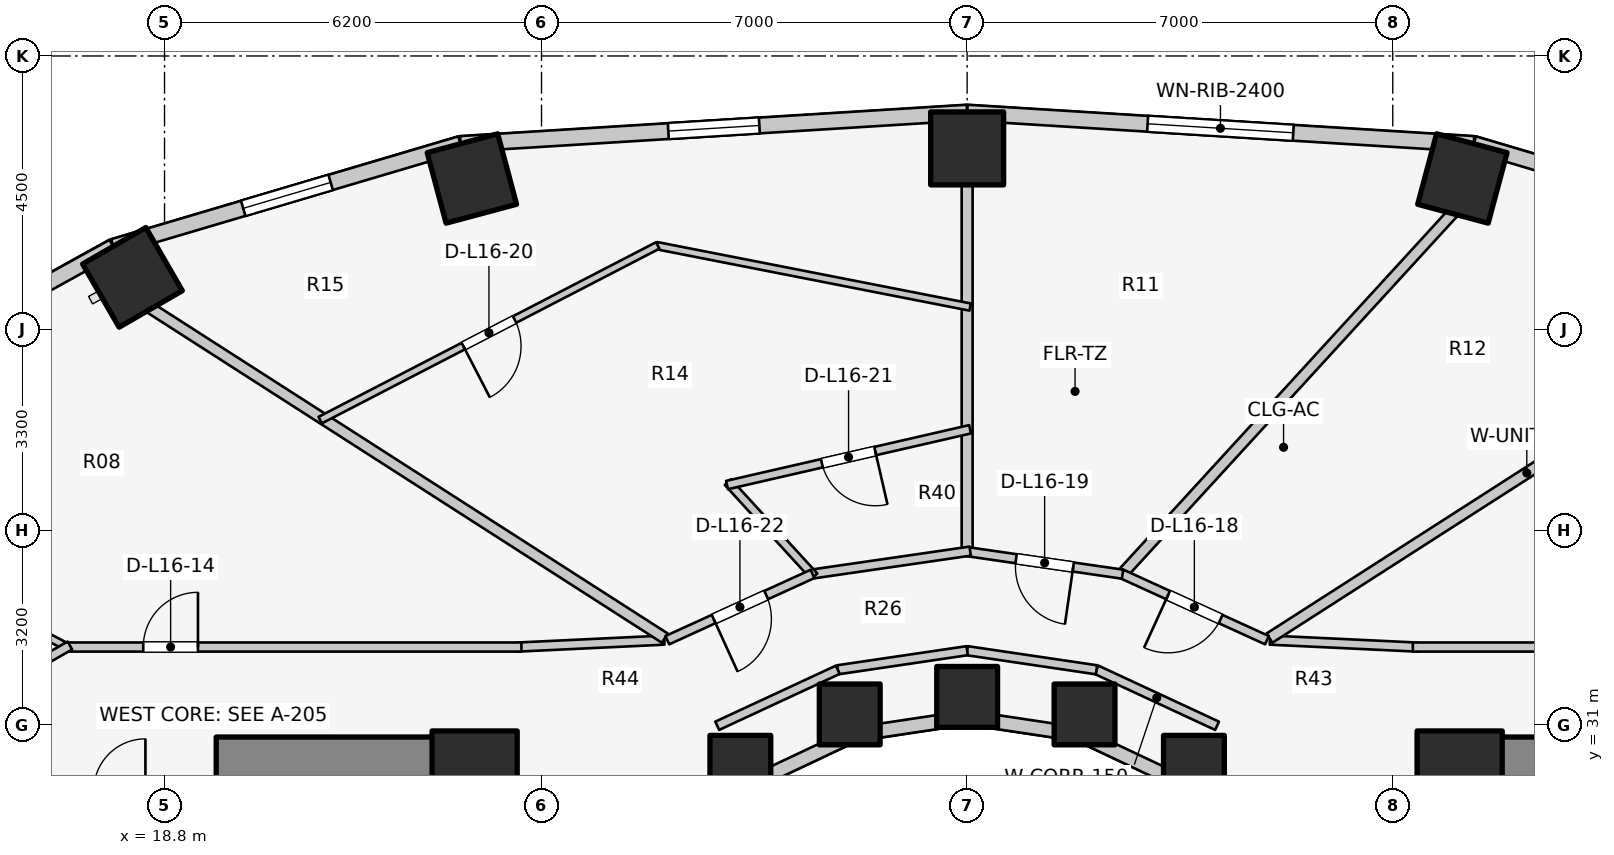
"""IFC4 building model, lengths in metres.
Left out: names, types, materials, properties, quantities, classifications, styles, units other than length and angle.
Written with IfcOpenShell. Run it as: python <this file> out.ifc"""

import sys

from ifc_helpers import new_model, si_unit, direction, frame, frame_2d, origin, origin_2d, place, context, subcontext, project, spatial, rectangle, extrude, element, fill, save


model = new_model("IFC4")
c1 = context("Model", 3, precision=1e-05, world=origin(), true_north=direction((0.0, 1.0)))
c2 = subcontext(c1, "Body", "Model", "MODEL_VIEW")
j1 = project(units=[si_unit("LENGTHUNIT", "METRE"), si_unit("PLANEANGLEUNIT", "RADIAN")], contexts=[c1])
p1 = place(None, origin())
s1 = spatial("IfcSite", under=j1, at=p1, CompositionType="ELEMENT")
p2 = place(p1, origin())
s2 = spatial("IfcBuilding", under=s1, at=p2, CompositionType="ELEMENT")
p3 = place(p2, frame((0.0, 0.0, 55.5)))
s3 = spatial("IfcBuildingStorey", under=s2, at=p3, CompositionType="ELEMENT", Elevation=55.5)
for number, where, z_axis, x_axis in (
    (1, (19.65, 30.35, 0.0), (0.0, 0.0, 1.0), (1.0, 0.0, 0.0)),
    (2, (39.85, 30.35, 0.0), (0.0, 0.0, 1.0), (1.0, 0.0, 0.0)),
):
    element("IfcWall", number, at=place(p3, frame(where, z_axis=z_axis, x_axis=x_axis)), inside=s3, PredefinedType="SHEAR", context=c2, shape_type="SweptSolid", body=[
        extrude(rectangle(XDim=4.5, YDim=0.9, at=frame_2d((2.25, 0.0))), origin(), (0.0, 0.0, 1.0), 3.1),
    ])
for number, where, z_axis, x_axis in (
    (3, (23.9, 30.2, 0.0), (0.0, 0.0, 1.0), (1.0, 0.0, 0.0)),
    (4, (40.1, 30.2, 0.0), (0.0, 0.0, 1.0), (1.0, 0.0, 0.0)),
):
    element("IfcColumn", number, at=place(p3, frame(where, z_axis=z_axis, x_axis=x_axis)), inside=s3, PredefinedType="COLUMN", context=c2, shape_type="SweptSolid", body=[
        extrude(rectangle(XDim=1.4, YDim=1.4, at=origin_2d()), origin(), (0.0, 0.0, 1.0), 3.1),
    ])
for number, where, z_axis, x_axis in (
    (5, (35.73, 30.327, 0.0), (0.0, 0.0, 1.0), (1.0, 0.0, 0.0)),
    (6, (33.931, 31.172, 0.0), (0.0, 0.0, 1.0), (1.0, 0.0, 0.0)),
):
    element("IfcColumn", number, at=place(p3, frame(where, z_axis=z_axis, x_axis=x_axis)), inside=s3, PredefinedType="COLUMN", context=c2, shape_type="SweptSolid", body=[
        extrude(rectangle(XDim=1.0, YDim=1.0, at=origin_2d()), origin(), (0.0, 0.0, 1.0), 3.1),
    ])
p4 = place(p3, frame((40.145, 39.986, 0.0), z_axis=(0.0, 0.0, 1.0), x_axis=(0.258819045103, 0.965925826289, 0.0)))
e7 = element("IfcColumn", 7, at=p4, inside=s3, PredefinedType="COLUMN", context=c2, shape_type="SweptSolid", body=[
    extrude(rectangle(XDim=1.2, YDim=1.2, at=origin_2d()), origin(), (0.0, 0.0, 1.0), 3.1),
])
p5 = place(p3, frame((32.0, 31.46, 0.0), z_axis=(0.0, 0.0, 1.0), x_axis=(1.0, 0.0, 0.0)))
e8 = element("IfcColumn", 8, at=p5, inside=s3, PredefinedType="COLUMN", context=c2, shape_type="SweptSolid", body=[
    extrude(rectangle(XDim=1.0, YDim=1.0, at=origin_2d()), origin(), (0.0, 0.0, 1.0), 3.1),
])
p6 = place(p3, frame((32.0, 40.48, 0.0), z_axis=(0.0, 0.0, 1.0), x_axis=(0.0, 1.0, 0.0)))
e9 = element("IfcColumn", 9, at=p6, inside=s3, PredefinedType="COLUMN", context=c2, shape_type="SweptSolid", body=[
    extrude(rectangle(XDim=1.2, YDim=1.2, at=origin_2d()), origin(), (0.0, 0.0, 1.0), 3.1),
])
p7 = place(p3, frame((30.069, 31.172, 0.0), z_axis=(0.0, 0.0, 1.0), x_axis=(1.0, 0.0, 0.0)))
e10 = element("IfcColumn", 10, at=p7, inside=s3, PredefinedType="COLUMN", context=c2, shape_type="SweptSolid", body=[
    extrude(rectangle(XDim=1.0, YDim=1.0, at=origin_2d()), origin(), (0.0, 0.0, 1.0), 3.1),
])
p8 = place(p3, frame((23.855, 39.986, 0.0), z_axis=(0.0, 0.0, 1.0), x_axis=(-0.258819045103, 0.965925826289, 0.0)))
e11 = element("IfcColumn", 11, at=p8, inside=s3, PredefinedType="COLUMN", context=c2, shape_type="SweptSolid", body=[
    extrude(rectangle(XDim=1.2, YDim=1.2, at=origin_2d()), origin(), (0.0, 0.0, 1.0), 3.1),
])
p9 = place(p3, frame((28.27, 30.327, 0.0), z_axis=(0.0, 0.0, 1.0), x_axis=(1.0, 0.0, 0.0)))
e12 = element("IfcColumn", 12, at=p9, inside=s3, PredefinedType="COLUMN", context=c2, shape_type="SweptSolid", body=[
    extrude(rectangle(XDim=1.0, YDim=1.0, at=origin_2d()), origin(), (0.0, 0.0, 1.0), 3.1),
])
p10 = place(p3, frame((18.273, 38.359, 0.0), z_axis=(0.0, 0.0, 1.0), x_axis=(-0.5, 0.866025403784, 0.0)))
e13 = element("IfcColumn", 13, at=p10, inside=s3, PredefinedType="COLUMN", context=c2, shape_type="SweptSolid", body=[
    extrude(rectangle(XDim=1.2, YDim=1.2, at=origin_2d()), origin(), (0.0, 0.0, 1.0), 3.1),
])
p11 = place(p3, frame((35.56, 30.032, 0.0), z_axis=(0.0, 0.0, 1.0), x_axis=(-0.904179699603, 0.427152280606, 0.0)))
e14 = element("IfcWall", 14, at=p11, inside=s3, PredefinedType="STANDARD", context=c2, shape_type="SweptSolid", body=[
    extrude(rectangle(XDim=1.899, YDim=0.23, at=frame_2d((0.95, 0.0))), origin(), (0.0, 0.0, 1.0), 2.16),
])
for number, where, z_axis, x_axis in (
    (15, (33.843, 30.843, 0.0), (0.0, 0.0, 1.0), (-0.989, 0.149, 0.0)),
    (16, (32.0, 31.12, 0.0), (0.0, 0.0, 1.0), (-0.989, -0.149, 0.0)),
):
    element("IfcWall", number, at=place(p3, frame(where, z_axis=z_axis, x_axis=x_axis)), inside=s3, PredefinedType="STANDARD", context=c2, shape_type="SweptSolid", body=[
        extrude(rectangle(XDim=1.864, YDim=0.23, at=frame_2d((0.932, 0.0))), origin(), (0.0, 0.0, 1.0), 2.16),
    ])
p12 = place(p3, frame((30.157, 30.843, 0.0), z_axis=(0.0, 0.0, 1.0), x_axis=(-0.904179699603, -0.427152280606, 0.0)))
e17 = element("IfcWall", 17, at=p12, inside=s3, PredefinedType="STANDARD", context=c2, shape_type="SweptSolid", body=[
    extrude(rectangle(XDim=1.899, YDim=0.23, at=frame_2d((0.95, 0.0))), origin(), (0.0, 0.0, 1.0), 2.16),
])
p13 = place(p3, frame((46.042, 38.862, 0.0), z_axis=(0.0, 0.0, 1.0), x_axis=(-0.958843593522, 0.283934786811, 0.0)))
e18 = element("IfcWall", 18, at=p13, inside=s3, PredefinedType="STANDARD", context=c2, shape_type="SweptSolid", body=[
    extrude(rectangle(XDim=5.955, YDim=0.26, at=frame_2d((2.978, 0.0))), origin(), (0.0, 0.0, 1.0), 2.85),
])
p14 = place(p13, frame((2.228, 0.0, 0.75)))
e19 = element("IfcOpeningElement", 19, at=p14, cuts=e18, PredefinedType="OPENING", context=c2, shape_type="SweptSolid", body=[
    extrude(rectangle(XDim=1.5, YDim=1.6, at=frame_2d((0.75, 0.8))), frame((0.0, 0.14, 0.0), z_axis=(0.0, -1.0, 0.0), x_axis=(1.0, 0.0, 0.0)), (0.0, 0.0, 1.0), 0.28),
])
p15 = place(p3, frame((40.332, 40.553, 0.0), z_axis=(0.0, 0.0, 1.0), x_axis=(-0.998090514779, 0.061768311519, 0.0)))
e20 = element("IfcWall", 20, at=p15, inside=s3, PredefinedType="STANDARD", context=c2, shape_type="SweptSolid", body=[
    extrude(rectangle(XDim=8.348, YDim=0.26, at=frame_2d((4.174, 0.0))), origin(), (0.0, 0.0, 1.0), 2.85),
])
p16 = place(p15, frame((2.974, 0.0, 0.75)))
e21 = element("IfcOpeningElement", 21, at=p16, cuts=e20, PredefinedType="OPENING", context=c2, shape_type="SweptSolid", body=[
    extrude(rectangle(XDim=2.4, YDim=1.7, at=frame_2d((1.2, 0.85))), frame((0.0, 0.14, 0.0), z_axis=(0.0, -1.0, 0.0), x_axis=(1.0, 0.0, 0.0)), (0.0, 0.0, 1.0), 0.28),
])
p17 = place(p3, frame((32.0, 41.069, 0.0), z_axis=(0.0, 0.0, 1.0), x_axis=(-0.998090514779, -0.061768311519, 0.0)))
e22 = element("IfcWall", 22, at=p17, inside=s3, PredefinedType="STANDARD", context=c2, shape_type="SweptSolid", body=[
    extrude(rectangle(XDim=8.348, YDim=0.26, at=frame_2d((4.174, 0.0))), origin(), (0.0, 0.0, 1.0), 2.85),
])
p18 = place(p17, frame((3.424, 0.0, 0.75)))
e23 = element("IfcOpeningElement", 23, at=p18, cuts=e22, PredefinedType="OPENING", context=c2, shape_type="SweptSolid", body=[
    extrude(rectangle(XDim=1.5, YDim=1.6, at=frame_2d((0.75, 0.8))), frame((0.0, 0.14, 0.0), z_axis=(0.0, -1.0, 0.0), x_axis=(1.0, 0.0, 0.0)), (0.0, 0.0, 1.0), 0.28),
])
p19 = place(p3, frame((23.668, 40.553, 0.0), z_axis=(0.0, 0.0, 1.0), x_axis=(-0.958843593522, -0.283934786811, 0.0)))
e24 = element("IfcWall", 24, at=p19, inside=s3, PredefinedType="STANDARD", context=c2, shape_type="SweptSolid", body=[
    extrude(rectangle(XDim=5.955, YDim=0.26, at=frame_2d((2.978, 0.0))), origin(), (0.0, 0.0, 1.0), 2.85),
])
p20 = place(p19, frame((2.228, 0.0, 0.75)))
e25 = element("IfcOpeningElement", 25, at=p20, cuts=e24, PredefinedType="OPENING", context=c2, shape_type="SweptSolid", body=[
    extrude(rectangle(XDim=1.5, YDim=1.6, at=frame_2d((0.75, 0.8))), frame((0.0, 0.14, 0.0), z_axis=(0.0, -1.0, 0.0), x_axis=(1.0, 0.0, 0.0)), (0.0, 0.0, 1.0), 0.28),
])
p21 = place(p3, frame((17.958, 38.862, 0.0), z_axis=(0.0, 0.0, 1.0), x_axis=(-0.875137303239, -0.483874674352, 0.0)))
e26 = element("IfcWall", 26, at=p21, inside=s3, PredefinedType="STANDARD", context=c2, shape_type="SweptSolid", body=[
    extrude(rectangle(XDim=4.985, YDim=0.26, at=frame_2d((2.493, 0.0))), origin(), (0.0, 0.0, 1.0), 2.85),
])
p22 = place(p3, frame((36.11, 30.985, 0.0), z_axis=(0.0, 0.0, 1.0), x_axis=(-0.906943449489, 0.421252393975, 0.0)))
e27 = element("IfcWall", 27, at=p22, inside=s3, PredefinedType="PARTITIONING", context=c2, shape_type="SweptSolid", body=[
    extrude(rectangle(XDim=2.186, YDim=0.15, at=frame_2d((1.093, 0.0))), origin(), (0.0, 0.0, 1.0), 2.237),
])
for number, where, z_axis, x_axis in (
    (28, (34.127, 31.906, 0.0), (0.0, 0.0, 1.0), (-0.989, 0.146, 0.0)),
    (29, (32.0, 32.22, 0.0), (0.0, 0.0, 1.0), (-0.989, -0.146, 0.0)),
):
    element("IfcWall", number, at=place(p3, frame(where, z_axis=z_axis, x_axis=x_axis)), inside=s3, PredefinedType="PARTITIONING", context=c2, shape_type="SweptSolid", body=[
        extrude(rectangle(XDim=2.151, YDim=0.15, at=frame_2d((1.075, 0.0))), origin(), (0.0, 0.0, 1.0), 2.237),
    ])
p23 = place(p3, frame((29.873, 31.906, 0.0), z_axis=(0.0, 0.0, 1.0), x_axis=(-0.906943449489, -0.421252393975, 0.0)))
e30 = element("IfcWall", 30, at=p23, inside=s3, PredefinedType="PARTITIONING", context=c2, shape_type="SweptSolid", body=[
    extrude(rectangle(XDim=2.186, YDim=0.15, at=frame_2d((1.093, 0.0))), origin(), (0.0, 0.0, 1.0), 2.237),
])
p24 = place(p3, frame((36.98, 32.394, 0.0), z_axis=(0.0, 0.0, 1.0), x_axis=(0.998877427952, -0.047369651964, 0.0)))
e31 = element("IfcWall", 31, at=p24, inside=s3, PredefinedType="PARTITIONING", context=c2, shape_type="SweptSolid", body=[
    extrude(rectangle(XDim=2.433, YDim=0.15, at=frame_2d((1.216, 0.0))), origin(), (0.0, 0.0, 1.0), 2.237),
])
p25 = place(p3, frame((39.33, 32.28, 0.0), z_axis=(0.0, 0.0, 1.0), x_axis=(1.0, 0.0, 0.0)))
e32 = element("IfcWall", 32, at=p25, inside=s3, PredefinedType="PARTITIONING", context=c2, shape_type="SweptSolid", body=[
    extrude(rectangle(XDim=7.52, YDim=0.15, at=frame_2d((3.76, 0.0))), origin(), (0.0, 0.0, 1.0), 2.237),
])
p26 = place(p25, frame((5.22, 0.0, 0.0)))
e33 = element("IfcOpeningElement", 33, at=p26, cuts=e32, PredefinedType="OPENING", context=c2, shape_type="SweptSolid", body=[
    extrude(rectangle(XDim=0.9, YDim=2.1, at=frame_2d((0.45, 1.05))), frame((0.0, 0.085, 0.0), z_axis=(0.0, -1.0, 0.0), x_axis=(1.0, 0.0, 0.0)), (0.0, 0.0, 1.0), 0.17),
])
p27 = place(p3, frame((17.244, 32.257, 0.0), z_axis=(0.0, 0.0, 1.0), x_axis=(-0.885586030676, 0.464475383924, 0.0)))
e34 = element("IfcWall", 34, at=p27, inside=s3, PredefinedType="MOVABLE", context=c2, shape_type="SweptSolid", body=[
    extrude(rectangle(XDim=2.376, YDim=0.12, at=frame_2d((1.188, 0.0))), origin(), (0.0, 0.0, 1.0), 2.855),
])
p28 = place(p3, frame((27.02, 32.394, 0.0), z_axis=(0.0, 0.0, 1.0), x_axis=(-0.998877427952, -0.047369651964, 0.0)))
e35 = element("IfcWall", 35, at=p28, inside=s3, PredefinedType="PARTITIONING", context=c2, shape_type="SweptSolid", body=[
    extrude(rectangle(XDim=2.433, YDim=0.15, at=frame_2d((1.216, 0.0))), origin(), (0.0, 0.0, 1.0), 2.237),
])
p29 = place(p3, frame((17.15, 32.28, 0.0), z_axis=(0.0, 0.0, 1.0), x_axis=(1.0, 0.0, 0.0)))
e36 = element("IfcWall", 36, at=p29, inside=s3, PredefinedType="PARTITIONING", context=c2, shape_type="SweptSolid", body=[
    extrude(rectangle(XDim=7.52, YDim=0.15, at=frame_2d((3.76, 0.0))), origin(), (0.0, 0.0, 1.0), 2.237),
])
p30 = place(p29, frame((1.3, 0.0, 0.0)))
e37 = element("IfcOpeningElement", 37, at=p30, cuts=e36, PredefinedType="OPENING", context=c2, shape_type="SweptSolid", body=[
    extrude(rectangle(XDim=0.9, YDim=2.1, at=frame_2d((0.45, 1.05))), frame((0.0, 0.085, 0.0), z_axis=(0.0, -1.0, 0.0), x_axis=(1.0, 0.0, 0.0)), (0.0, 0.0, 1.0), 0.17),
])
p31 = place(p3, frame((17.243, 32.305, 0.0), z_axis=(0.0, 0.0, 1.0), x_axis=(-0.867991349648, -0.496579315857, 0.0)))
e38 = element("IfcWall", 38, at=p31, inside=s3, PredefinedType="PARTITIONING", context=c2, shape_type="SweptSolid", body=[
    extrude(rectangle(XDim=2.567, YDim=0.15, at=frame_2d((1.283, 0.0))), origin(), (0.0, 0.0, 1.0), 2.069),
])
p32 = place(p3, frame((36.971, 32.426, 0.0), z_axis=(0.0, 0.0, 1.0), x_axis=(0.841689919529, 0.5399611832, 0.0)))
e39 = element("IfcWall", 39, at=p32, inside=s3, PredefinedType="PARTITIONING", context=c2, shape_type="SweptSolid", body=[
    extrude(rectangle(XDim=10.058, YDim=0.18, at=frame_2d((5.029, 0.0))), origin(), (0.0, 0.0, 1.0), 2.237),
])
p33 = place(p3, frame((34.586, 33.521, 0.0), z_axis=(0.0, 0.0, 1.0), x_axis=(0.675465011224, 0.737392038615, 0.0)))
e40 = element("IfcWall", 40, at=p33, inside=s3, PredefinedType="PARTITIONING", context=c2, shape_type="SweptSolid", body=[
    extrude(rectangle(XDim=8.007, YDim=0.18, at=frame_2d((4.003, 0.0))), origin(), (0.0, 0.0, 1.0), 2.237),
])
p34 = place(p3, frame((32.0, 33.905, 0.0), z_axis=(0.0, 0.0, 1.0), x_axis=(0.0, 1.0, 0.0)))
e41 = element("IfcWall", 41, at=p34, inside=s3, PredefinedType="PARTITIONING", context=c2, shape_type="SweptSolid", body=[
    extrude(rectangle(XDim=5.995, YDim=0.18, at=frame_2d((2.998, 0.0))), origin(), (0.0, 0.0, 1.0), 2.237),
])
p35 = place(p3, frame((27.029, 32.426, 0.0), z_axis=(0.0, 0.0, 1.0), x_axis=(-0.841689919529, 0.5399611832, 0.0)))
e42 = element("IfcWall", 42, at=p35, inside=s3, PredefinedType="PARTITIONING", context=c2, shape_type="SweptSolid", body=[
    extrude(rectangle(XDim=10.058, YDim=0.18, at=frame_2d((5.029, 0.0))), origin(), (0.0, 0.0, 1.0), 2.237),
])
p36 = place(p3, frame((36.931, 32.393, 0.0), z_axis=(0.0, 0.0, 1.0), x_axis=(-0.909747571199, 0.415161843982, 0.0)))
e43 = element("IfcWall", 43, at=p36, inside=s3, PredefinedType="PARTITIONING", context=c2, shape_type="SweptSolid", body=[
    extrude(rectangle(XDim=2.625, YDim=0.15, at=frame_2d((1.312, 0.0))), origin(), (0.0, 0.0, 1.0), 2.237),
])
p37 = place(p36, frame((0.838, 0.0, 0.0)))
e44 = element("IfcOpeningElement", 44, at=p37, cuts=e43, PredefinedType="OPENING", context=c2, shape_type="SweptSolid", body=[
    extrude(rectangle(XDim=0.95, YDim=2.1, at=frame_2d((0.475, 1.05))), frame((0.0, 0.085, 0.0), z_axis=(0.0, -1.0, 0.0), x_axis=(1.0, 0.0, 0.0)), (0.0, 0.0, 1.0), 0.17),
])
p38 = place(p3, frame((34.556, 33.478, 0.0), z_axis=(0.0, 0.0, 1.0), x_axis=(-0.989637894688, 0.143585644814, 0.0)))
e45 = element("IfcWall", 45, at=p38, inside=s3, PredefinedType="PARTITIONING", context=c2, shape_type="SweptSolid", body=[
    extrude(rectangle(XDim=2.59, YDim=0.15, at=frame_2d((1.295, 0.0))), origin(), (0.0, 0.0, 1.0), 2.237),
])
p39 = place(p38, frame((0.82, 0.0, 0.0)))
e46 = element("IfcOpeningElement", 46, at=p39, cuts=e45, PredefinedType="OPENING", context=c2, shape_type="SweptSolid", body=[
    extrude(rectangle(XDim=0.95, YDim=2.1, at=frame_2d((0.475, 1.05))), frame((0.0, 0.085, 0.0), z_axis=(0.0, -1.0, 0.0), x_axis=(1.0, 0.0, 0.0)), (0.0, 0.0, 1.0), 0.17),
])
p40 = place(p3, frame((32.049, 37.871, 0.0), z_axis=(0.0, 0.0, 1.0), x_axis=(-0.981343325718, 0.192263561471, 0.0)))
e47 = element("IfcWall", 47, at=p40, inside=s3, PredefinedType="MOVABLE", context=c2, shape_type="SweptSolid", body=[
    extrude(rectangle(XDim=5.255, YDim=0.12, at=frame_2d((2.627, 0.0))), origin(), (0.0, 0.0, 1.0), 2.237),
])
p41 = place(p3, frame((26.911, 38.884, 0.0), z_axis=(0.0, 0.0, 1.0), x_axis=(-0.88815498257, -0.459544042433, 0.0)))
e48 = element("IfcWall", 48, at=p41, inside=s3, PredefinedType="MOVABLE", context=c2, shape_type="SweptSolid", body=[
    extrude(rectangle(XDim=6.251, YDim=0.12, at=frame_2d((3.125, 0.0))), origin(), (0.0, 0.0, 1.0), 2.237),
])
p42 = place(p41, frame((2.65, 0.0, 0.0)))
e49 = element("IfcOpeningElement", 49, at=p42, cuts=e48, PredefinedType="OPENING", context=c2, shape_type="SweptSolid", body=[
    extrude(rectangle(XDim=0.95, YDim=2.1, at=frame_2d((0.475, 1.05))), frame((0.0, 0.07, 0.0), z_axis=(0.0, -1.0, 0.0), x_axis=(1.0, 0.0, 0.0)), (0.0, 0.0, 1.0), 0.14),
])
p43 = place(p3, frame((32.05, 33.857, 0.0), z_axis=(0.0, 0.0, 1.0), x_axis=(-0.989649898776, -0.143502884474, 0.0)))
e50 = element("IfcWall", 50, at=p43, inside=s3, PredefinedType="PARTITIONING", context=c2, shape_type="SweptSolid", body=[
    extrude(rectangle(XDim=2.676, YDim=0.15, at=frame_2d((1.338, 0.0))), origin(), (0.0, 0.0, 1.0), 2.237),
])
p44 = place(p3, frame((29.484, 33.443, 0.0), z_axis=(0.0, 0.0, 1.0), x_axis=(-0.675445566455, 0.737409849918, 0.0)))
e51 = element("IfcWall", 51, at=p44, inside=s3, PredefinedType="PLUMBINGWALL", context=c2, shape_type="SweptSolid", body=[
    extrude(rectangle(XDim=2.1, YDim=0.14, at=frame_2d((1.05, 0.0))), origin(), (0.0, 0.0, 1.0), 2.855),
])
p45 = place(p3, frame((32.049, 35.861, 0.0), z_axis=(0.0, 0.0, 1.0), x_axis=(-0.974672340529, -0.223637717318, 0.0)))
e52 = element("IfcWall", 52, at=p45, inside=s3, PredefinedType="PLUMBINGWALL", context=c2, shape_type="SweptSolid", body=[
    extrude(rectangle(XDim=4.101, YDim=0.14, at=frame_2d((2.051, 0.0))), origin(), (0.0, 0.0, 1.0), 2.237),
])
p46 = place(p45, frame((1.601, 0.0, 0.0)))
e53 = element("IfcOpeningElement", 53, at=p46, cuts=e52, PredefinedType="OPENING", context=c2, shape_type="SweptSolid", body=[
    extrude(rectangle(XDim=0.9, YDim=2.1, at=frame_2d((0.45, 1.05))), frame((0.0, 0.08, 0.0), z_axis=(0.0, -1.0, 0.0), x_axis=(1.0, 0.0, 0.0)), (0.0, 0.0, 1.0), 0.16),
])
p47 = place(p3, frame((29.457, 33.482, 0.0), z_axis=(0.0, 0.0, 1.0), x_axis=(-0.909747571199, -0.415161843982, 0.0)))
e54 = element("IfcWall", 54, at=p47, inside=s3, PredefinedType="PARTITIONING", context=c2, shape_type="SweptSolid", body=[
    extrude(rectangle(XDim=2.625, YDim=0.15, at=frame_2d((1.312, 0.0))), origin(), (0.0, 0.0, 1.0), 2.237),
])
p48 = place(p47, frame((0.838, 0.0, 0.0)))
e55 = element("IfcOpeningElement", 55, at=p48, cuts=e54, PredefinedType="OPENING", context=c2, shape_type="SweptSolid", body=[
    extrude(rectangle(XDim=0.95, YDim=2.1, at=frame_2d((0.475, 1.05))), frame((0.0, 0.085, 0.0), z_axis=(0.0, -1.0, 0.0), x_axis=(1.0, 0.0, 0.0)), (0.0, 0.0, 1.0), 0.17),
])
p49 = place(p16, origin())
e56 = element("IfcWindow", 56, at=p49, inside=s3, PartitioningType="SINGLE_PANEL", PredefinedType="WINDOW", context=c2, shape_type="SweptSolid", body=[
    extrude(rectangle(XDim=2.4, YDim=1.7, at=frame_2d((1.2, 0.85))), frame((0.0, 0.03, 0.0), z_axis=(0.0, -1.0, 0.0), x_axis=(1.0, 0.0, 0.0)), (0.0, 0.0, 1.0), 0.06),
])
fill(e21, e56)
p50 = place(p18, origin())
e57 = element("IfcWindow", 57, at=p50, inside=s3, PartitioningType="SINGLE_PANEL", PredefinedType="WINDOW", context=c2, shape_type="SweptSolid", body=[
    extrude(rectangle(XDim=1.5, YDim=1.6, at=frame_2d((0.75, 0.8))), frame((0.0, 0.03, 0.0), z_axis=(0.0, -1.0, 0.0), x_axis=(1.0, 0.0, 0.0)), (0.0, 0.0, 1.0), 0.06),
])
fill(e23, e57)
p51 = place(p20, origin())
e58 = element("IfcWindow", 58, at=p51, inside=s3, PartitioningType="SINGLE_PANEL", PredefinedType="WINDOW", context=c2, shape_type="SweptSolid", body=[
    extrude(rectangle(XDim=1.5, YDim=1.6, at=frame_2d((0.75, 0.8))), frame((0.0, 0.03, 0.0), z_axis=(0.0, -1.0, 0.0), x_axis=(1.0, 0.0, 0.0)), (0.0, 0.0, 1.0), 0.06),
])
fill(e25, e58)
p52 = place(p30, origin())
e59 = element("IfcDoor", 59, at=p52, inside=s3, OperationType="SINGLE_SWING_RIGHT", PredefinedType="DOOR", context=c2, shape_type="SweptSolid", body=[
    extrude(rectangle(XDim=0.9, YDim=2.1, at=frame_2d((0.45, 1.05))), frame((0.0, 0.025, 0.0), z_axis=(0.0, -1.0, 0.0), x_axis=(1.0, 0.0, 0.0)), (0.0, 0.0, 1.0), 0.05),
])
fill(e37, e59)
p53 = place(p37, origin())
e60 = element("IfcDoor", 60, at=p53, inside=s3, OperationType="SINGLE_SWING_RIGHT", PredefinedType="DOOR", context=c2, shape_type="SweptSolid", body=[
    extrude(rectangle(XDim=0.95, YDim=2.1, at=frame_2d((0.475, 1.05))), frame((0.0, 0.025, 0.0), z_axis=(0.0, -1.0, 0.0), x_axis=(1.0, 0.0, 0.0)), (0.0, 0.0, 1.0), 0.05),
])
fill(e44, e60)
p54 = place(p39, origin())
e61 = element("IfcDoor", 61, at=p54, inside=s3, OperationType="SINGLE_SWING_LEFT", PredefinedType="DOOR", context=c2, shape_type="SweptSolid", body=[
    extrude(rectangle(XDim=0.95, YDim=2.1, at=frame_2d((0.475, 1.05))), frame((0.0, 0.025, 0.0), z_axis=(0.0, -1.0, 0.0), x_axis=(1.0, 0.0, 0.0)), (0.0, 0.0, 1.0), 0.05),
])
fill(e46, e61)
p55 = place(p42, origin())
e62 = element("IfcDoor", 62, at=p55, inside=s3, OperationType="SINGLE_SWING_RIGHT", PredefinedType="DOOR", context=c2, shape_type="SweptSolid", body=[
    extrude(rectangle(XDim=0.95, YDim=2.1, at=frame_2d((0.475, 1.05))), frame((0.0, 0.025, 0.0), z_axis=(0.0, -1.0, 0.0), x_axis=(1.0, 0.0, 0.0)), (0.0, 0.0, 1.0), 0.05),
])
fill(e49, e62)
p56 = place(p46, origin())
e63 = element("IfcDoor", 63, at=p56, inside=s3, OperationType="SINGLE_SWING_LEFT", PredefinedType="DOOR", context=c2, shape_type="SweptSolid", body=[
    extrude(rectangle(XDim=0.9, YDim=2.1, at=frame_2d((0.45, 1.05))), frame((0.0, 0.025, 0.0), z_axis=(0.0, -1.0, 0.0), x_axis=(1.0, 0.0, 0.0)), (0.0, 0.0, 1.0), 0.05),
])
fill(e53, e63)
p57 = place(p48, origin())
e64 = element("IfcDoor", 64, at=p57, inside=s3, OperationType="SINGLE_SWING_RIGHT", PredefinedType="DOOR", context=c2, shape_type="SweptSolid", body=[
    extrude(rectangle(XDim=0.95, YDim=2.1, at=frame_2d((0.475, 1.05))), frame((0.0, 0.025, 0.0), z_axis=(0.0, -1.0, 0.0), x_axis=(1.0, 0.0, 0.0)), (0.0, 0.0, 1.0), 0.05),
])
fill(e55, e64)
save(model, sys.argv[1])
